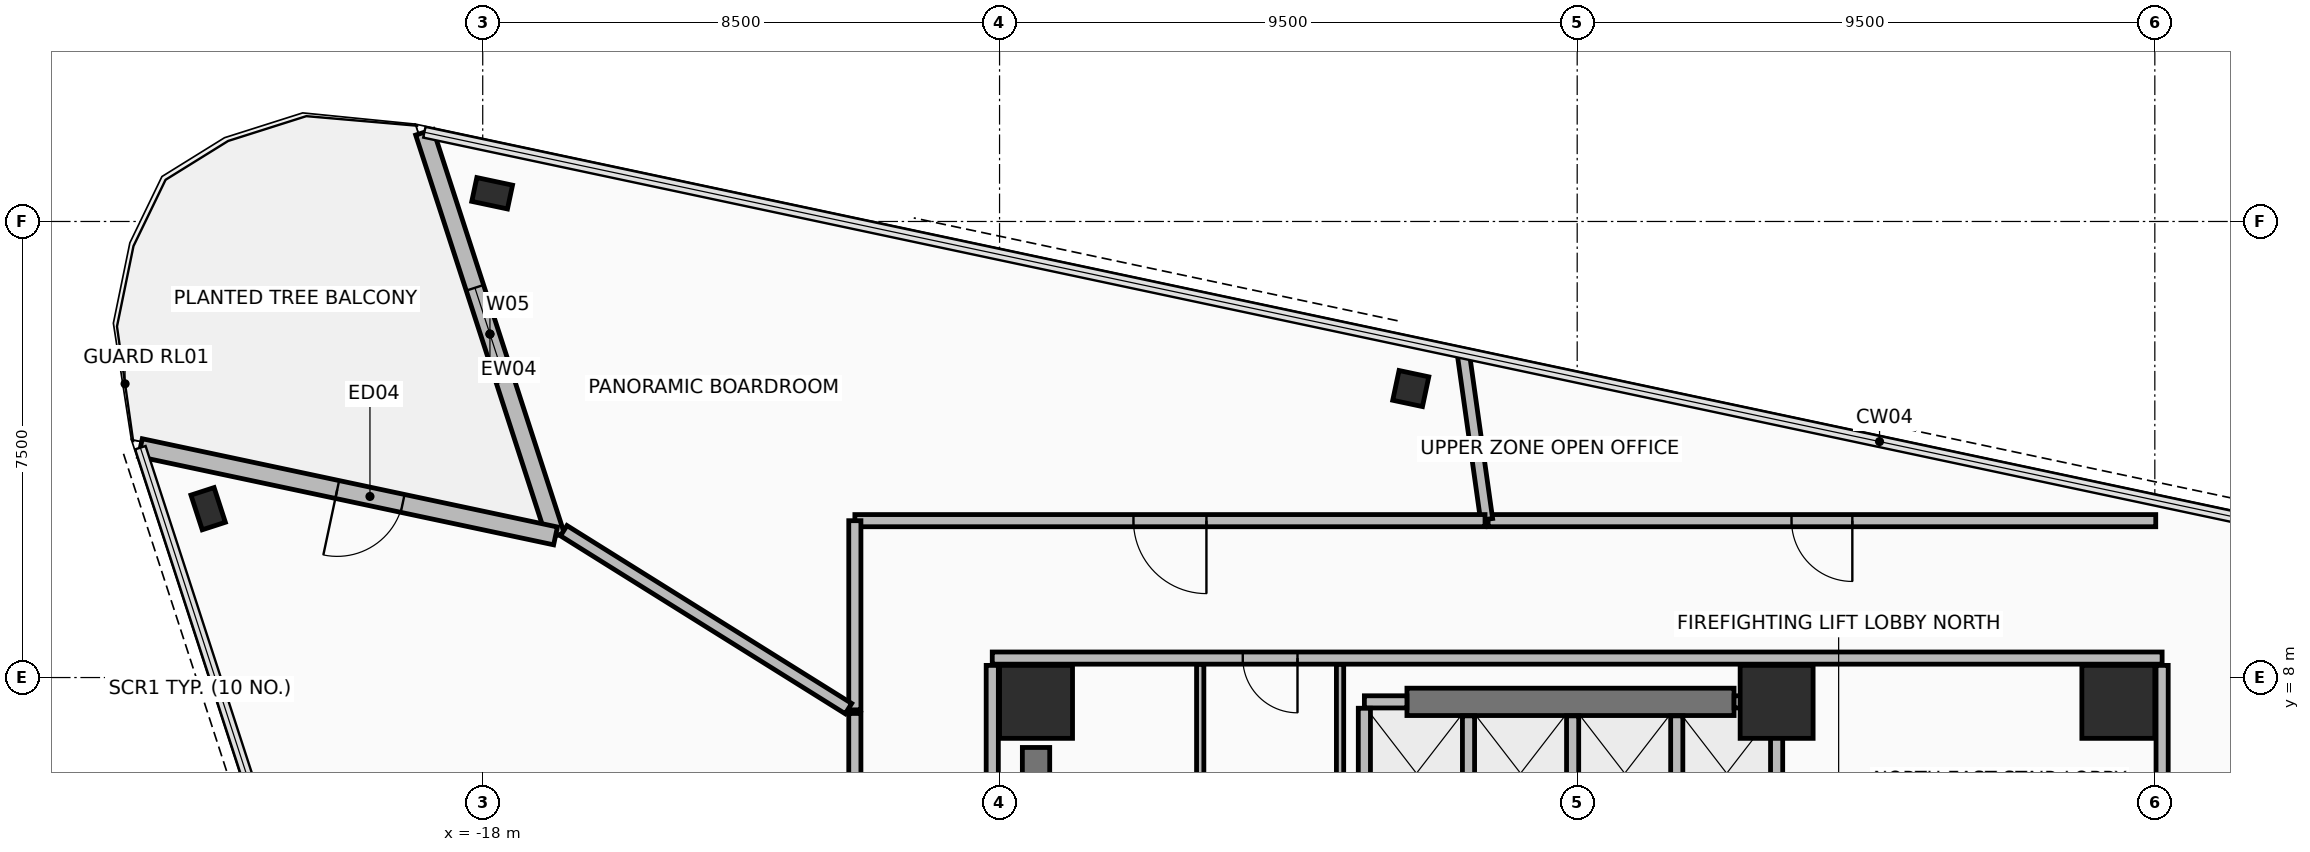
"""IFC4 building model, lengths in metres.
Left out: names, types, materials, properties, quantities, classifications, styles, units other than length and angle.
Written with IfcOpenShell. Run it as: python <this file> out.ifc"""

import sys

from ifc_helpers import new_model, si_unit, direction, frame, frame_2d, origin, origin_2d, place, context, subcontext, project, spatial, rectangle, hollow_rectangle, extrude, element, fill, save


model = new_model("IFC4")
c1 = context("Model", 3, precision=1e-05, world=origin(), true_north=direction((0.0, 1.0)))
c2 = subcontext(c1, "Body", "Model", "MODEL_VIEW")
j1 = project(units=[si_unit("LENGTHUNIT", "METRE"), si_unit("PLANEANGLEUNIT", "RADIAN")], contexts=[c1])
p1 = place(None, origin())
s1 = spatial("IfcSite", under=j1, at=p1, CompositionType="ELEMENT")
p2 = place(p1, origin())
s2 = spatial("IfcBuilding", under=s1, at=p2, CompositionType="ELEMENT")
p3 = place(p2, frame((0.0, 0.0, 200.45)))
s3 = spatial("IfcBuildingStorey", under=s2, at=p3, CompositionType="ELEMENT", Elevation=200.45)
for number, where, z_axis, x_axis in (
    (1, (8.9, 7.6, 0.0), (0.0, 0.0, 1.0), (1.0, 0.0, 0.0)),
    (2, (3.28, 7.6, 0.0), (0.0, 0.0, 1.0), (1.0, 0.0, 0.0)),
    (3, (-8.9, 7.6, 0.0), (0.0, 0.0, 1.0), (1.0, 0.0, 0.0)),
):
    element("IfcColumn", number, at=place(p3, frame(where, z_axis=z_axis, x_axis=x_axis)), inside=s3, PredefinedType="COLUMN", context=c2, shape_type="SweptSolid", body=[
        extrude(rectangle(XDim=1.2, YDim=1.2, at=origin_2d()), origin(), (0.0, 0.0, 1.0), 3.6),
    ])
p4 = place(p3, frame((-22.515, 10.777, 0.0), z_axis=(0.0, 0.0, 1.0), x_axis=(-0.309016994375, 0.951056516295, 0.0)))
e4 = element("IfcColumn", 4, at=p4, inside=s3, PredefinedType="COLUMN", context=c2, shape_type="SweptSolid", body=[
    extrude(hollow_rectangle(XDim=0.4, YDim=0.6, WallThickness=0.03, at=origin_2d()), origin(), (0.0, 0.0, 1.0), 3.6),
])
p5 = place(p3, frame((-2.737, 12.753, 0.0), z_axis=(0.0, 0.0, 1.0), x_axis=(-0.978147600734, 0.207911690818, 0.0)))
e5 = element("IfcColumn", 5, at=p5, inside=s3, PredefinedType="COLUMN", context=c2, shape_type="SweptSolid", body=[
    extrude(hollow_rectangle(XDim=0.5, YDim=0.5, WallThickness=0.032, at=origin_2d()), origin(), (0.0, 0.0, 1.0), 3.6),
])
p6 = place(p3, frame((-17.845, 15.964, 0.0), z_axis=(0.0, 0.0, 1.0), x_axis=(-0.978147600734, 0.207911690818, 0.0)))
e6 = element("IfcColumn", 6, at=p6, inside=s3, PredefinedType="COLUMN", context=c2, shape_type="SweptSolid", body=[
    extrude(hollow_rectangle(XDim=0.4, YDim=0.6, WallThickness=0.03, at=origin_2d()), origin(), (0.0, 0.0, 1.0), 3.6),
])
p7 = place(p3, frame((-18.96, 16.968, 0.0), z_axis=(0.0, 0.0, 1.0), x_axis=(0.309030708092, -0.951052060329, 0.0)))
e7 = element("IfcWall", 7, at=p7, inside=s3, PredefinedType="STANDARD", context=c2, shape_type="SweptSolid", body=[
    extrude(rectangle(XDim=6.98, YDim=0.3, at=frame_2d((3.49, 0.0))), origin(), (0.0, 0.0, 1.0), 2.715),
])
p8 = place(p7, frame((2.69, 0.0, 0.335)))
e8 = element("IfcOpeningElement", 8, at=p8, cuts=e7, PredefinedType="OPENING", context=c2, shape_type="SweptSolid", body=[
    extrude(rectangle(XDim=1.6, YDim=2.2, at=frame_2d((0.8, 1.1))), frame((0.0, 0.16, 0.0), z_axis=(0.0, -1.0, 0.0), x_axis=(1.0, 0.0, 0.0)), (0.0, 0.0, 1.0), 0.32),
])
p9 = place(p3, frame((-16.803, 10.329, 0.0), z_axis=(0.0, 0.0, 1.0), x_axis=(-0.9781486268, 0.207906863497, 0.0)))
e9 = element("IfcWall", 9, at=p9, inside=s3, PredefinedType="STANDARD", context=c2, shape_type="SweptSolid", body=[
    extrude(rectangle(XDim=6.98, YDim=0.3, at=frame_2d((3.49, 0.0))), origin(), (0.0, 0.0, 1.0), 2.715),
])
p10 = place(p9, frame((2.57, 0.0, 0.0)))
e10 = element("IfcOpeningElement", 10, at=p10, cuts=e9, PredefinedType="OPENING", context=c2, shape_type="SweptSolid", body=[
    extrude(rectangle(XDim=1.1, YDim=2.2, at=frame_2d((0.55, 1.1))), frame((0.0, 0.16, 0.0), z_axis=(0.0, -1.0, 0.0), x_axis=(1.0, 0.0, 0.0)), (0.0, 0.0, 1.0), 0.32),
])
p11 = place(p3, frame((-2.8, 7.6, 0.0), z_axis=(0.0, 0.0, 1.0), x_axis=(1.0, 0.0, 0.0)))
e11 = element("IfcWall", 11, at=p11, inside=s3, PredefinedType="SHEAR", context=c2, shape_type="SweptSolid", body=[
    extrude(rectangle(XDim=5.38, YDim=0.45, at=frame_2d((2.69, 0.0))), origin(), (0.0, 0.0, 1.0), 3.42),
])
p12 = place(p3, frame((-8.9, -3.85, 0.0), z_axis=(0.0, 0.0, 1.0), x_axis=(0.0, 1.0, 0.0)))
e12 = element("IfcWall", 12, at=p12, inside=s3, PredefinedType="SHEAR", context=c2, shape_type="SweptSolid", body=[
    extrude(rectangle(XDim=10.7, YDim=0.45, at=frame_2d((5.35, 0.0))), origin(), (0.0, 0.0, 1.0), 3.42),
])
p13 = place(p3, frame((9.62, 8.32, 0.0), z_axis=(0.0, 0.0, 1.0), x_axis=(-1.0, 0.0, 0.0)))
e13 = element("IfcWall", 13, at=p13, inside=s3, PredefinedType="PARTITIONING", context=c2, shape_type="SweptSolid", body=[
    extrude(rectangle(XDim=19.24, YDim=0.2, at=frame_2d((9.62, 0.0))), origin(), (0.0, 0.0, 1.0), 2.865),
])
p14 = place(p13, frame((14.22, 0.0, 0.0)))
e14 = element("IfcOpeningElement", 14, at=p14, cuts=e13, PredefinedType="OPENING", context=c2, shape_type="SweptSolid", body=[
    extrude(rectangle(XDim=0.9, YDim=2.1, at=frame_2d((0.45, 1.05))), frame((0.0, 0.11, 0.0), z_axis=(0.0, -1.0, 0.0), x_axis=(1.0, 0.0, 0.0)), (0.0, 0.0, 1.0), 0.22),
])
p15 = place(p3, frame((-9.62, 8.2, 0.0), z_axis=(0.0, 0.0, 1.0), x_axis=(0.0, -1.0, 0.0)))
e15 = element("IfcWall", 15, at=p15, inside=s3, PredefinedType="PARTITIONING", context=c2, shape_type="SweptSolid", body=[
    extrude(rectangle(XDim=16.4, YDim=0.2, at=frame_2d((8.2, 0.0))), origin(), (0.0, 0.0, 1.0), 2.765),
])
p16 = place(p15, frame((12.65, 0.0, 0.0)))
e16 = element("IfcOpeningElement", 16, at=p16, cuts=e15, PredefinedType="OPENING", context=c2, shape_type="SweptSolid", body=[
    extrude(rectangle(XDim=1.1, YDim=2.15, at=frame_2d((0.55, 1.075))), frame((0.0, 0.11, 0.0), z_axis=(0.0, -1.0, 0.0), x_axis=(1.0, 0.0, 0.0)), (0.0, 0.0, 1.0), 0.22),
])
p17 = place(p3, frame((9.62, -8.2, 0.0), z_axis=(0.0, 0.0, 1.0), x_axis=(0.0, 1.0, 0.0)))
e17 = element("IfcWall", 17, at=p17, inside=s3, PredefinedType="PARTITIONING", context=c2, shape_type="SweptSolid", body=[
    extrude(rectangle(XDim=16.4, YDim=0.2, at=frame_2d((8.2, 0.0))), origin(), (0.0, 0.0, 1.0), 2.865),
])
p18 = place(p17, frame((12.65, 0.0, 0.0)))
e18 = element("IfcOpeningElement", 18, at=p18, cuts=e17, PredefinedType="OPENING", context=c2, shape_type="SweptSolid", body=[
    extrude(rectangle(XDim=1.1, YDim=2.15, at=frame_2d((0.55, 1.075))), frame((0.0, 0.11, 0.0), z_axis=(0.0, -1.0, 0.0), x_axis=(1.0, 0.0, 0.0)), (0.0, 0.0, 1.0), 0.22),
])
p19 = place(p3, frame((-3.5, 7.6, 0.0), z_axis=(0.0, 0.0, 1.0), x_axis=(1.0, 0.0, 0.0)))
e19 = element("IfcWall", 19, at=p19, inside=s3, PredefinedType="PARTITIONING", context=c2, shape_type="SweptSolid", body=[
    extrude(rectangle(XDim=0.7, YDim=0.2, at=frame_2d((0.35, 0.0))), origin(), (0.0, 0.0, 1.0), 2.715),
])
p20 = place(p3, frame((-3.5, 5.38, 0.0), z_axis=(0.0, 0.0, 1.0), x_axis=(0.0, 1.0, 0.0)))
e20 = element("IfcWall", 20, at=p20, inside=s3, PredefinedType="PARTITIONING", context=c2, shape_type="SweptSolid", body=[
    extrude(rectangle(XDim=2.115, YDim=0.2, at=frame_2d((1.058, 0.0))), origin(), (0.0, 0.0, 1.0), 2.715),
])
for number, where, z_axis, x_axis in (
    (21, (-1.788, 5.38, 0.0), (0.0, 0.0, 1.0), (0.0, 1.0, 0.0)),
    (22, (-0.075, 5.38, 0.0), (0.0, 0.0, 1.0), (0.0, 1.0, 0.0)),
    (23, (1.637, 5.38, 0.0), (0.0, 0.0, 1.0), (0.0, 1.0, 0.0)),
):
    element("IfcWall", number, at=place(p3, frame(where, z_axis=z_axis, x_axis=x_axis)), inside=s3, PredefinedType="PARTITIONING", context=c2, shape_type="SweptSolid", body=[
        extrude(rectangle(XDim=1.99, YDim=0.2, at=frame_2d((0.995, 0.0))), origin(), (0.0, 0.0, 1.0), 2.715),
    ])
p21 = place(p3, frame((2.58, 7.6, 0.0), z_axis=(0.0, 0.0, 1.0), x_axis=(1.0, 0.0, 0.0)))
e24 = element("IfcWall", 24, at=p21, inside=s3, PredefinedType="PARTITIONING", context=c2, shape_type="SweptSolid", body=[
    extrude(rectangle(XDim=0.7, YDim=0.2, at=frame_2d((0.35, 0.0))), origin(), (0.0, 0.0, 1.0), 2.715),
])
p22 = place(p3, frame((3.28, 5.38, 0.0), z_axis=(0.0, 0.0, 1.0), x_axis=(0.0, 1.0, 0.0)))
e25 = element("IfcWall", 25, at=p22, inside=s3, PredefinedType="PARTITIONING", context=c2, shape_type="SweptSolid", body=[
    extrude(rectangle(XDim=2.115, YDim=0.2, at=frame_2d((1.058, 0.0))), origin(), (0.0, 0.0, 1.0), 2.715),
])
for number, where, z_axis, x_axis in (
    (26, (-3.9, 5.465, 0.0), (0.0, 0.0, 1.0), (0.0, 1.0, 0.0)),
    (27, (-6.2, 8.215, 0.0), (0.0, 0.0, 1.0), (0.0, -1.0, 0.0)),
):
    element("IfcWall", number, at=place(p3, frame(where, z_axis=z_axis, x_axis=x_axis)), inside=s3, PredefinedType="PARTITIONING", context=c2, shape_type="SweptSolid", body=[
        extrude(rectangle(XDim=2.75, YDim=0.12, at=frame_2d((1.375, 0.0))), origin(), (0.0, 0.0, 1.0), 2.715),
    ])
p23 = place(p3, frame((9.515, 10.58, 0.0), z_axis=(0.0, 0.0, 1.0), x_axis=(-1.0, 0.0, 0.0)))
e28 = element("IfcWall", 28, at=p23, inside=s3, PredefinedType="PARTITIONING", context=c2, shape_type="SweptSolid", body=[
    extrude(rectangle(XDim=10.98, YDim=0.2, at=frame_2d((5.49, 0.0))), origin(), (0.0, 0.0, 1.0), 2.715),
])
p24 = place(p23, frame((4.99, 0.0, 0.0)))
e29 = element("IfcOpeningElement", 29, at=p24, cuts=e28, PredefinedType="OPENING", context=c2, shape_type="SweptSolid", body=[
    extrude(rectangle(XDim=1.0, YDim=2.15, at=frame_2d((0.5, 1.075))), frame((0.0, 0.11, 0.0), z_axis=(0.0, -1.0, 0.0), x_axis=(1.0, 0.0, 0.0)), (0.0, 0.0, 1.0), 0.22),
])
p25 = place(p3, frame((-1.49, 10.602, 0.0), z_axis=(0.0, 0.0, 1.0), x_axis=(-0.139168128583, 0.990268767551, 0.0)))
e30 = element("IfcWall", 30, at=p25, inside=s3, PredefinedType="PARTITIONING", context=c2, shape_type="SweptSolid", body=[
    extrude(rectangle(XDim=2.761, YDim=0.2, at=frame_2d((1.381, 0.0))), origin(), (0.0, 0.0, 1.0), 2.715),
])
p26 = place(p3, frame((-1.516, 10.58, 0.0), z_axis=(0.0, 0.0, 1.0), x_axis=(-1.0, 0.0, 0.0)))
e31 = element("IfcWall", 31, at=p26, inside=s3, PredefinedType="PARTITIONING", context=c2, shape_type="SweptSolid", body=[
    extrude(rectangle(XDim=10.364, YDim=0.2, at=frame_2d((5.182, 0.0))), origin(), (0.0, 0.0, 1.0), 2.865),
])
p27 = place(p26, frame((4.582, 0.0, 0.0)))
e32 = element("IfcOpeningElement", 32, at=p27, cuts=e31, PredefinedType="OPENING", context=c2, shape_type="SweptSolid", body=[
    extrude(rectangle(XDim=1.2, YDim=2.15, at=frame_2d((0.6, 1.075))), frame((0.0, 0.11, 0.0), z_axis=(0.0, -1.0, 0.0), x_axis=(1.0, 0.0, 0.0)), (0.0, 0.0, 1.0), 0.22),
])
p28 = place(p3, frame((-11.88, 10.579, 0.0), z_axis=(0.0, 0.0, 1.0), x_axis=(0.0, -1.0, 0.0)))
e33 = element("IfcWall", 33, at=p28, inside=s3, PredefinedType="PARTITIONING", context=c2, shape_type="SweptSolid", body=[
    extrude(rectangle(XDim=3.111, YDim=0.2, at=frame_2d((1.555, 0.0))), origin(), (0.0, 0.0, 1.0), 2.765),
])
p29 = place(p3, frame((-11.985, 7.489, 0.0), z_axis=(0.0, 0.0, 1.0), x_axis=(-0.848035563326, 0.529939320427, 0.0)))
e34 = element("IfcWall", 34, at=p29, inside=s3, PredefinedType="PARTITIONING", context=c2, shape_type="SweptSolid", body=[
    extrude(rectangle(XDim=5.521, YDim=0.2, at=frame_2d((2.761, 0.0))), origin(), (0.0, 0.0, 1.0), 2.865),
])
p30 = place(p3, frame((-11.88, 7.41, 0.0), z_axis=(0.0, 0.0, 1.0), x_axis=(0.0, -1.0, 0.0)))
e35 = element("IfcWall", 35, at=p30, inside=s3, PredefinedType="PARTITIONING", context=c2, shape_type="SweptSolid", body=[
    extrude(rectangle(XDim=11.251, YDim=0.2, at=frame_2d((5.626, 0.0))), origin(), (0.0, 0.0, 1.0), 3.42),
])
p31 = place(p30, frame((5.126, 0.0, 0.0)))
e36 = element("IfcOpeningElement", 36, at=p31, cuts=e35, PredefinedType="OPENING", context=c2, shape_type="SweptSolid", body=[
    extrude(rectangle(XDim=1.0, YDim=2.15, at=frame_2d((0.5, 1.075))), frame((0.0, 0.11, 0.0), z_axis=(0.0, -1.0, 0.0), x_axis=(1.0, 0.0, 0.0)), (0.0, 0.0, 1.0), 0.22),
])
p32 = place(p10, frame((1.1, 0.0, 0.0), z_axis=(0.0, 0.0, 1.0), x_axis=(-1.0, 0.0, 0.0)))
e37 = element("IfcDoor", 37, at=p32, inside=s3, OperationType="SINGLE_SWING_LEFT", PredefinedType="DOOR", context=c2, shape_type="SweptSolid", body=[
    extrude(rectangle(XDim=1.1, YDim=2.2, at=frame_2d((0.55, 1.1))), frame((0.0, 0.025, 0.0), z_axis=(0.0, -1.0, 0.0), x_axis=(1.0, 0.0, 0.0)), (0.0, 0.0, 1.0), 0.05),
])
fill(e10, e37)
p33 = place(p8, origin())
e38 = element("IfcWindow", 38, at=p33, inside=s3, PartitioningType="SINGLE_PANEL", PredefinedType="WINDOW", context=c2, shape_type="SweptSolid", body=[
    extrude(rectangle(XDim=1.6, YDim=2.2, at=frame_2d((0.8, 1.1))), frame((0.0, 0.03, 0.0), z_axis=(0.0, -1.0, 0.0), x_axis=(1.0, 0.0, 0.0)), (0.0, 0.0, 1.0), 0.06),
])
fill(e8, e38)
p34 = place(p14, origin())
e39 = element("IfcDoor", 39, at=p34, inside=s3, OperationType="SINGLE_SWING_LEFT", PredefinedType="DOOR", context=c2, shape_type="SweptSolid", body=[
    extrude(rectangle(XDim=0.9, YDim=2.1, at=frame_2d((0.45, 1.05))), frame((0.0, 0.025, 0.0), z_axis=(0.0, -1.0, 0.0), x_axis=(1.0, 0.0, 0.0)), (0.0, 0.0, 1.0), 0.05),
])
fill(e14, e39)
p35 = place(p24, origin())
e40 = element("IfcDoor", 40, at=p35, inside=s3, OperationType="SINGLE_SWING_RIGHT", PredefinedType="DOOR", context=c2, shape_type="SweptSolid", body=[
    extrude(rectangle(XDim=1.0, YDim=2.15, at=frame_2d((0.5, 1.075))), frame((0.0, 0.025, 0.0), z_axis=(0.0, -1.0, 0.0), x_axis=(1.0, 0.0, 0.0)), (0.0, 0.0, 1.0), 0.05),
])
fill(e29, e40)
p36 = place(p27, origin())
e41 = element("IfcDoor", 41, at=p36, inside=s3, OperationType="SINGLE_SWING_LEFT", PredefinedType="DOOR", context=c2, shape_type="SweptSolid", body=[
    extrude(rectangle(XDim=1.2, YDim=2.15, at=frame_2d((0.6, 1.075))), frame((0.0, 0.025, 0.0), z_axis=(0.0, -1.0, 0.0), x_axis=(1.0, 0.0, 0.0)), (0.0, 0.0, 1.0), 0.05),
])
fill(e32, e41)
save(model, sys.argv[1])
